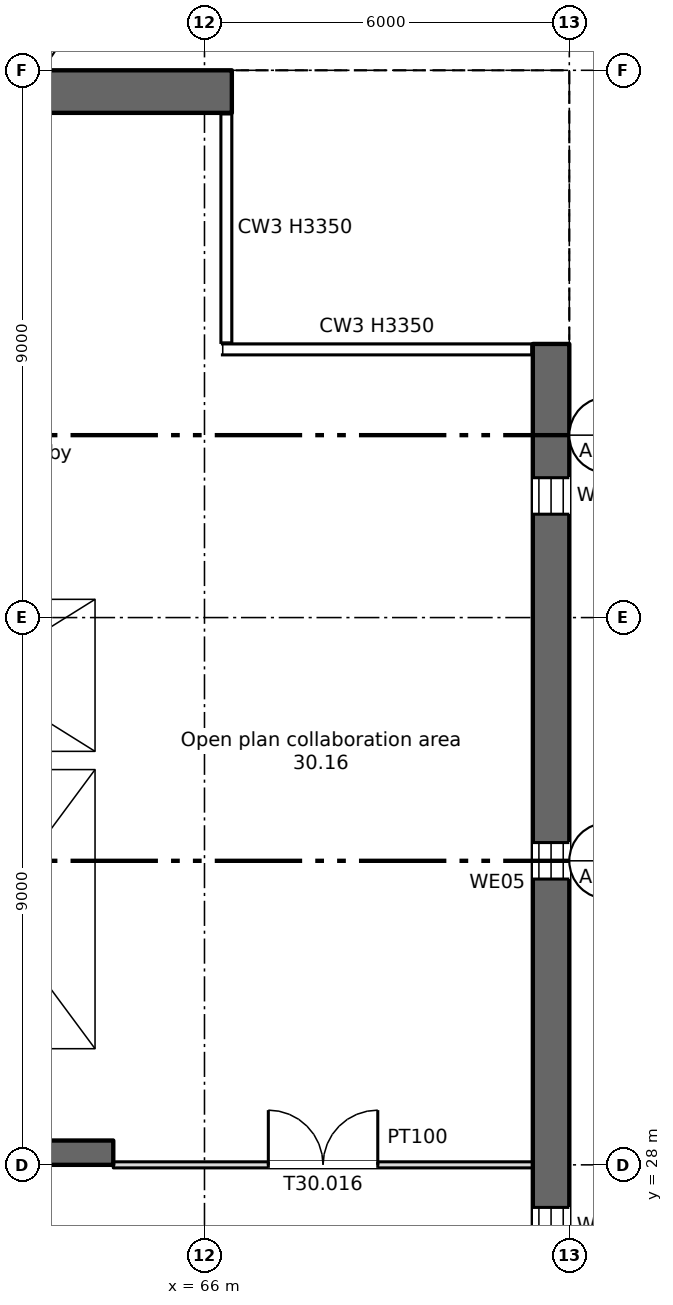
"""IFC4 building model, lengths in metres.
Left out: names, types, materials, properties, quantities, classifications, styles, units other than length and angle.
Written with IfcOpenShell. Run it as: python <this file> out.ifc"""

import sys

from ifc_helpers import new_model, si_unit, direction, frame, frame_2d, origin, place, context, subcontext, project, spatial, rectangle, extrude, element, fill, save


model = new_model("IFC4")
c1 = context("Model", 3, precision=1e-05, world=origin(), true_north=direction((0.0, 1.0)))
c2 = subcontext(c1, "Body", "Model", "MODEL_VIEW")
j1 = project(units=[si_unit("LENGTHUNIT", "METRE"), si_unit("PLANEANGLEUNIT", "RADIAN")], contexts=[c1])
p1 = place(None, origin())
s1 = spatial("IfcSite", under=j1, at=p1, CompositionType="ELEMENT")
p2 = place(p1, origin())
s2 = spatial("IfcBuilding", under=s1, at=p2, CompositionType="ELEMENT")
p3 = place(p2, frame((0.0, 0.0, 208.0)))
s3 = spatial("IfcBuildingStorey", under=s2, at=p3, CompositionType="ELEMENT", Elevation=208.0)
p4 = place(p3, frame((71.7, 7.5, 0.0), z_axis=(0.0, 0.0, 1.0), x_axis=(0.0, 1.0, 0.0)))
e1 = element("IfcWall", 1, at=p4, inside=s3, PredefinedType="SHEAR", context=c2, shape_type="SweptSolid", body=[
    extrude(rectangle(XDim=34.0, YDim=0.6, at=frame_2d((17.0, 0.0))), origin(), (0.0, 0.0, 1.0), 3.35),
])
p5 = place(p4, frame((1.2, 0.0, 0.6)))
e2 = element("IfcOpeningElement", 2, at=p5, cuts=e1, PredefinedType="OPENING", context=c2, shape_type="SweptSolid", body=[
    extrude(rectangle(XDim=0.6, YDim=2.4, at=frame_2d((0.3, 1.2))), frame((0.0, 0.31, 0.0), z_axis=(0.0, -1.0, 0.0), x_axis=(1.0, 0.0, 0.0)), (0.0, 0.0, 1.0), 0.62),
])
p6 = place(p4, frame((7.2, 0.0, 0.6)))
e3 = element("IfcOpeningElement", 3, at=p6, cuts=e1, PredefinedType="OPENING", context=c2, shape_type="SweptSolid", body=[
    extrude(rectangle(XDim=0.6, YDim=2.4, at=frame_2d((0.3, 1.2))), frame((0.0, 0.31, 0.0), z_axis=(0.0, -1.0, 0.0), x_axis=(1.0, 0.0, 0.0)), (0.0, 0.0, 1.0), 0.62),
])
p7 = place(p4, frame((13.2, 0.0, 0.6)))
e4 = element("IfcOpeningElement", 4, at=p7, cuts=e1, PredefinedType="OPENING", context=c2, shape_type="SweptSolid", body=[
    extrude(rectangle(XDim=0.6, YDim=2.4, at=frame_2d((0.3, 1.2))), frame((0.0, 0.31, 0.0), z_axis=(0.0, -1.0, 0.0), x_axis=(1.0, 0.0, 0.0)), (0.0, 0.0, 1.0), 0.62),
])
p8 = place(p4, frame((19.2, 0.0, 0.6)))
e5 = element("IfcOpeningElement", 5, at=p8, cuts=e1, PredefinedType="OPENING", context=c2, shape_type="SweptSolid", body=[
    extrude(rectangle(XDim=0.6, YDim=2.4, at=frame_2d((0.3, 1.2))), frame((0.0, 0.31, 0.0), z_axis=(0.0, -1.0, 0.0), x_axis=(1.0, 0.0, 0.0)), (0.0, 0.0, 1.0), 0.62),
])
p9 = place(p4, frame((25.2, 0.0, 0.6)))
e6 = element("IfcOpeningElement", 6, at=p9, cuts=e1, PredefinedType="OPENING", context=c2, shape_type="SweptSolid", body=[
    extrude(rectangle(XDim=0.6, YDim=2.4, at=frame_2d((0.3, 1.2))), frame((0.0, 0.31, 0.0), z_axis=(0.0, -1.0, 0.0), x_axis=(1.0, 0.0, 0.0)), (0.0, 0.0, 1.0), 0.62),
])
p10 = place(p4, frame((31.2, 0.0, 0.6)))
e7 = element("IfcOpeningElement", 7, at=p10, cuts=e1, PredefinedType="OPENING", context=c2, shape_type="SweptSolid", body=[
    extrude(rectangle(XDim=0.6, YDim=2.4, at=frame_2d((0.3, 1.2))), frame((0.0, 0.31, 0.0), z_axis=(0.0, -1.0, 0.0), x_axis=(1.0, 0.0, 0.0)), (0.0, 0.0, 1.0), 0.62),
])
p11 = place(p3, frame((11.55, 45.65, 0.0), z_axis=(0.0, 0.0, 1.0), x_axis=(1.0, 0.0, 0.0)))
e8 = element("IfcWall", 8, at=p11, inside=s3, PredefinedType="SHEAR", context=c2, shape_type="SweptSolid", body=[
    extrude(rectangle(XDim=54.9, YDim=0.7, at=frame_2d((27.45, 0.0))), origin(), (0.0, 0.0, 1.0), 3.35),
])
p12 = place(p3, frame((6.6, 28.2, 0.0), z_axis=(0.0, 0.0, 1.0), x_axis=(1.0, 0.0, 0.0)))
e9 = element("IfcWall", 9, at=p12, inside=s3, PredefinedType="SHEAR", context=c2, shape_type="SweptSolid", body=[
    extrude(rectangle(XDim=57.9, YDim=0.4, at=frame_2d((28.95, 0.0))), origin(), (0.0, 0.0, 1.0), 3.35),
])
p13 = place(p12, frame((12.663, 0.0, 0.0)))
e10 = element("IfcOpeningElement", 10, at=p13, cuts=e9, PredefinedType="OPENING", context=c2, shape_type="SweptSolid", body=[
    extrude(rectangle(XDim=0.9, YDim=2.1, at=frame_2d((0.45, 1.05))), frame((0.0, 0.21, 0.0), z_axis=(0.0, -1.0, 0.0), x_axis=(1.0, 0.0, 0.0)), (0.0, 0.0, 1.0), 0.42),
])
p14 = place(p12, frame((15.238, 0.0, 0.0)))
e11 = element("IfcOpeningElement", 11, at=p14, cuts=e9, PredefinedType="OPENING", context=c2, shape_type="SweptSolid", body=[
    extrude(rectangle(XDim=0.9, YDim=2.1, at=frame_2d((0.45, 1.05))), frame((0.0, 0.21, 0.0), z_axis=(0.0, -1.0, 0.0), x_axis=(1.0, 0.0, 0.0)), (0.0, 0.0, 1.0), 0.42),
])
p15 = place(p12, frame((49.95, 0.0, 0.0)))
e12 = element("IfcOpeningElement", 12, at=p15, cuts=e9, PredefinedType="OPENING", context=c2, shape_type="SweptSolid", body=[
    extrude(rectangle(XDim=0.9, YDim=2.1, at=frame_2d((0.45, 1.05))), frame((0.0, 0.21, 0.0), z_axis=(0.0, -1.0, 0.0), x_axis=(1.0, 0.0, 0.0)), (0.0, 0.0, 1.0), 0.42),
])
p16 = place(p12, frame((0.663, 0.0, 0.0)))
e13 = element("IfcOpeningElement", 13, at=p16, cuts=e9, PredefinedType="OPENING", context=c2, shape_type="SweptSolid", body=[
    extrude(rectangle(XDim=0.9, YDim=2.1, at=frame_2d((0.45, 1.05))), frame((0.0, 0.21, 0.0), z_axis=(0.0, -1.0, 0.0), x_axis=(1.0, 0.0, 0.0)), (0.0, 0.0, 1.0), 0.42),
])
p17 = place(p12, frame((2.238, 0.0, 0.0)))
e14 = element("IfcOpeningElement", 14, at=p17, cuts=e9, PredefinedType="OPENING", context=c2, shape_type="SweptSolid", body=[
    extrude(rectangle(XDim=0.9, YDim=2.1, at=frame_2d((0.45, 1.05))), frame((0.0, 0.21, 0.0), z_axis=(0.0, -1.0, 0.0), x_axis=(1.0, 0.0, 0.0)), (0.0, 0.0, 1.0), 0.42),
])
p18 = place(p12, frame((4.8, 0.0, 0.0)))
e15 = element("IfcOpeningElement", 15, at=p18, cuts=e9, PredefinedType="OPENING", context=c2, shape_type="SweptSolid", body=[
    extrude(rectangle(XDim=1.2, YDim=2.1, at=frame_2d((0.6, 1.05))), frame((0.0, 0.21, 0.0), z_axis=(0.0, -1.0, 0.0), x_axis=(1.0, 0.0, 0.0)), (0.0, 0.0, 1.0), 0.42),
])
p19 = place(p12, frame((31.8, 0.0, 0.0)))
e16 = element("IfcOpeningElement", 16, at=p19, cuts=e9, PredefinedType="OPENING", context=c2, shape_type="SweptSolid", body=[
    extrude(rectangle(XDim=1.2, YDim=2.1, at=frame_2d((0.6, 1.05))), frame((0.0, 0.21, 0.0), z_axis=(0.0, -1.0, 0.0), x_axis=(1.0, 0.0, 0.0)), (0.0, 0.0, 1.0), 0.42),
])
p20 = place(p12, frame((55.3, 0.0, 0.0)))
e17 = element("IfcOpeningElement", 17, at=p20, cuts=e9, PredefinedType="OPENING", context=c2, shape_type="SweptSolid", body=[
    extrude(rectangle(XDim=1.2, YDim=2.1, at=frame_2d((0.6, 1.05))), frame((0.0, 0.21, 0.0), z_axis=(0.0, -1.0, 0.0), x_axis=(1.0, 0.0, 0.0)), (0.0, 0.0, 1.0), 0.42),
])
p21 = place(p12, frame((21.8, 0.0, 0.0)))
e18 = element("IfcOpeningElement", 18, at=p21, cuts=e9, PredefinedType="OPENING", context=c2, shape_type="SweptSolid", body=[
    extrude(rectangle(XDim=1.2, YDim=2.1, at=frame_2d((0.6, 1.05))), frame((0.0, 0.21, 0.0), z_axis=(0.0, -1.0, 0.0), x_axis=(1.0, 0.0, 0.0)), (0.0, 0.0, 1.0), 0.42),
])
p22 = place(p12, frame((41.8, 0.0, 0.0)))
e19 = element("IfcOpeningElement", 19, at=p22, cuts=e9, PredefinedType="OPENING", context=c2, shape_type="SweptSolid", body=[
    extrude(rectangle(XDim=1.2, YDim=2.1, at=frame_2d((0.6, 1.05))), frame((0.0, 0.21, 0.0), z_axis=(0.0, -1.0, 0.0), x_axis=(1.0, 0.0, 0.0)), (0.0, 0.0, 1.0), 0.42),
])
p23 = place(p12, frame((24.95, 0.0, 0.0)))
e20 = element("IfcOpeningElement", 20, at=p23, cuts=e9, PredefinedType="OPENING", context=c2, shape_type="SweptSolid", body=[
    extrude(rectangle(XDim=2.4, YDim=2.1, at=frame_2d((1.2, 1.05))), frame((0.0, 0.21, 0.0), z_axis=(0.0, -1.0, 0.0), x_axis=(1.0, 0.0, 0.0)), (0.0, 0.0, 1.0), 0.42),
])
p24 = place(p12, frame((37.45, 0.0, 0.0)))
e21 = element("IfcOpeningElement", 21, at=p24, cuts=e9, PredefinedType="OPENING", context=c2, shape_type="SweptSolid", body=[
    extrude(rectangle(XDim=2.4, YDim=2.1, at=frame_2d((1.2, 1.05))), frame((0.0, 0.21, 0.0), z_axis=(0.0, -1.0, 0.0), x_axis=(1.0, 0.0, 0.0)), (0.0, 0.0, 1.0), 0.42),
])
p25 = place(p12, frame((8.1, 0.0, 0.0)))
e22 = element("IfcOpeningElement", 22, at=p25, cuts=e9, PredefinedType="OPENING", context=c2, shape_type="SweptSolid", body=[
    extrude(rectangle(XDim=2.4, YDim=2.1, at=frame_2d((1.2, 1.05))), frame((0.0, 0.21, 0.0), z_axis=(0.0, -1.0, 0.0), x_axis=(1.0, 0.0, 0.0)), (0.0, 0.0, 1.0), 0.42),
])
p26 = place(p12, frame((28.95, 0.0, 0.0)))
e23 = element("IfcOpeningElement", 23, at=p26, cuts=e9, PredefinedType="OPENING", context=c2, shape_type="SweptSolid", body=[
    extrude(rectangle(XDim=0.9, YDim=2.1, at=frame_2d((0.45, 1.05))), frame((0.0, 0.21, 0.0), z_axis=(0.0, -1.0, 0.0), x_axis=(1.0, 0.0, 0.0)), (0.0, 0.0, 1.0), 0.42),
])
p27 = place(p12, frame((34.95, 0.0, 0.0)))
e24 = element("IfcOpeningElement", 24, at=p27, cuts=e9, PredefinedType="OPENING", context=c2, shape_type="SweptSolid", body=[
    extrude(rectangle(XDim=0.9, YDim=2.1, at=frame_2d((0.45, 1.05))), frame((0.0, 0.21, 0.0), z_axis=(0.0, -1.0, 0.0), x_axis=(1.0, 0.0, 0.0)), (0.0, 0.0, 1.0), 0.42),
])
p28 = place(p3, frame((64.35, 34.8, 0.0), z_axis=(0.0, 0.0, 1.0), x_axis=(0.0, 1.0, 0.0)))
e25 = element("IfcWall", 25, at=p28, inside=s3, PredefinedType="SHEAR", context=c2, shape_type="SweptSolid", body=[
    extrude(rectangle(XDim=10.5, YDim=0.3, at=frame_2d((5.25, 0.0))), origin(), (0.0, 0.0, 1.0), 3.35),
])
p29 = place(p3, frame((64.35, 28.4, 0.0), z_axis=(0.0, 0.0, 1.0), x_axis=(0.0, 1.0, 0.0)))
e26 = element("IfcWall", 26, at=p29, inside=s3, PredefinedType="SHEAR", context=c2, shape_type="SweptSolid", body=[
    extrude(rectangle(XDim=6.1, YDim=0.3, at=frame_2d((3.05, 0.0))), origin(), (0.0, 0.0, 1.0), 3.35),
])
p30 = place(p3, frame((60.2, 34.65, 0.0), z_axis=(0.0, 0.0, 1.0), x_axis=(1.0, 0.0, 0.0)))
e27 = element("IfcWall", 27, at=p30, inside=s3, PredefinedType="SHEAR", context=c2, shape_type="SweptSolid", body=[
    extrude(rectangle(XDim=4.3, YDim=0.3, at=frame_2d((2.15, 0.0))), origin(), (0.0, 0.0, 1.0), 3.35),
])
p31 = place(p3, frame((60.2, 37.45, 0.0), z_axis=(0.0, 0.0, 1.0), x_axis=(1.0, 0.0, 0.0)))
e28 = element("IfcWall", 28, at=p31, inside=s3, PredefinedType="SHEAR", context=c2, shape_type="SweptSolid", body=[
    extrude(rectangle(XDim=4.0, YDim=0.3, at=frame_2d((2.0, 0.0))), origin(), (0.0, 0.0, 1.0), 3.35),
])
p32 = place(p31, frame((1.45, 0.0, 0.0)))
e29 = element("IfcOpeningElement", 29, at=p32, cuts=e28, PredefinedType="OPENING", context=c2, shape_type="SweptSolid", body=[
    extrude(rectangle(XDim=1.1, YDim=2.1, at=frame_2d((0.55, 1.05))), frame((0.0, 0.16, 0.0), z_axis=(0.0, -1.0, 0.0), x_axis=(1.0, 0.0, 0.0)), (0.0, 0.0, 1.0), 0.32),
])
p33 = place(p3, frame((64.5, 28.0, 0.0), z_axis=(0.0, 0.0, 1.0), x_axis=(1.0, 0.0, 0.0)))
e30 = element("IfcWall", 30, at=p33, inside=s3, PredefinedType="PARTITIONING", context=c2, shape_type="SweptSolid", body=[
    extrude(rectangle(XDim=6.9, YDim=0.1, at=frame_2d((3.45, 0.0))), origin(), (0.0, 0.0, 1.0), 3.35),
])
p34 = place(p33, frame((2.55, 0.0, 0.0)))
e31 = element("IfcOpeningElement", 31, at=p34, cuts=e30, PredefinedType="OPENING", context=c2, shape_type="SweptSolid", body=[
    extrude(rectangle(XDim=1.8, YDim=2.1, at=frame_2d((0.9, 1.05))), frame((0.0, 0.06, 0.0), z_axis=(0.0, -1.0, 0.0), x_axis=(1.0, 0.0, 0.0)), (0.0, 0.0, 1.0), 0.12),
])
p35 = place(p8, origin())
e32 = element("IfcWindow", 32, at=p35, inside=s3, PartitioningType="SINGLE_PANEL", PredefinedType="WINDOW", context=c2, shape_type="SweptSolid", body=[
    extrude(rectangle(XDim=0.6, YDim=2.4, at=frame_2d((0.3, 1.2))), frame((0.0, 0.03, 0.0), z_axis=(0.0, -1.0, 0.0), x_axis=(1.0, 0.0, 0.0)), (0.0, 0.0, 1.0), 0.06),
])
fill(e5, e32)
p36 = place(p9, origin())
e33 = element("IfcWindow", 33, at=p36, inside=s3, PartitioningType="SINGLE_PANEL", PredefinedType="WINDOW", context=c2, shape_type="SweptSolid", body=[
    extrude(rectangle(XDim=0.6, YDim=2.4, at=frame_2d((0.3, 1.2))), frame((0.0, 0.03, 0.0), z_axis=(0.0, -1.0, 0.0), x_axis=(1.0, 0.0, 0.0)), (0.0, 0.0, 1.0), 0.06),
])
fill(e6, e33)
p37 = place(p10, origin())
e34 = element("IfcWindow", 34, at=p37, inside=s3, PartitioningType="SINGLE_PANEL", PredefinedType="WINDOW", context=c2, shape_type="SweptSolid", body=[
    extrude(rectangle(XDim=0.6, YDim=2.4, at=frame_2d((0.3, 1.2))), frame((0.0, 0.03, 0.0), z_axis=(0.0, -1.0, 0.0), x_axis=(1.0, 0.0, 0.0)), (0.0, 0.0, 1.0), 0.06),
])
fill(e7, e34)
p38 = place(p34, origin())
e35 = element("IfcDoor", 35, at=p38, inside=s3, OperationType="DOUBLE_DOOR_SINGLE_SWING", PredefinedType="DOOR", context=c2, shape_type="SweptSolid", body=[
    extrude(rectangle(XDim=1.8, YDim=2.1, at=frame_2d((0.9, 1.05))), frame((0.0, 0.025, 0.0), z_axis=(0.0, -1.0, 0.0), x_axis=(1.0, 0.0, 0.0)), (0.0, 0.0, 1.0), 0.05),
])
fill(e31, e35)
save(model, sys.argv[1])
